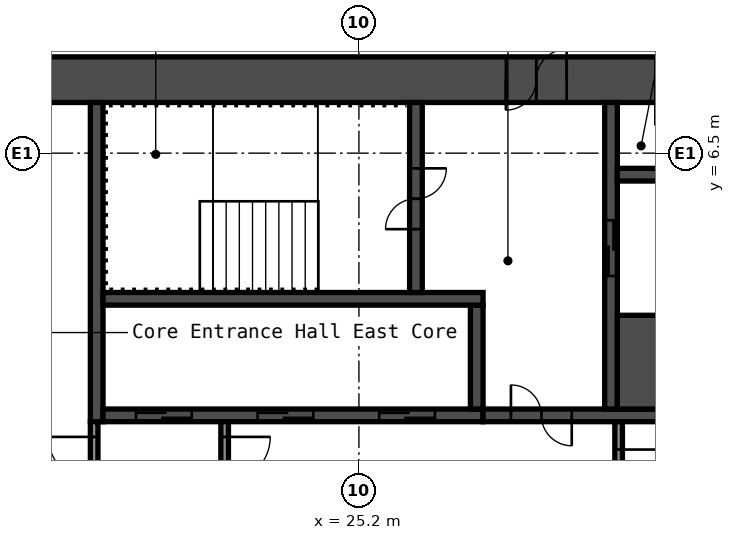
"""IFC4 building model, lengths in metres.
Left out: names, types, materials, properties, quantities, classifications, styles, units other than length and angle.
Written with IfcOpenShell. Run it as: python <this file> out.ifc"""

import sys

from ifc_helpers import new_model, si_unit, direction, frame, frame_2d, origin, place, context, subcontext, project, spatial, rectangle, extrude, element, fill, save


model = new_model("IFC4")
c1 = context("Model", 3, precision=1e-05, world=origin(), true_north=direction((0.0, 1.0)))
c2 = subcontext(c1, "Body", "Model", "MODEL_VIEW")
j1 = project(units=[si_unit("LENGTHUNIT", "METRE"), si_unit("PLANEANGLEUNIT", "RADIAN")], contexts=[c1])
p1 = place(None, origin())
s1 = spatial("IfcSite", under=j1, at=p1, CompositionType="ELEMENT")
p2 = place(p1, origin())
s2 = spatial("IfcBuilding", under=s1, at=p2, CompositionType="ELEMENT")
p3 = place(p2, frame((0.0, 0.0, 48.6)))
s3 = spatial("IfcBuildingStorey", under=s2, at=p3, CompositionType="ELEMENT", Elevation=48.6)
p4 = place(p3, frame((17.7, 7.95, 0.0), z_axis=(0.0, 0.0, 1.0), x_axis=(1.0, 0.0, 0.0)))
e1 = element("IfcWall", 1, at=p4, inside=s3, PredefinedType="SHEAR", context=c2, shape_type="SweptSolid", body=[
    extrude(rectangle(XDim=15.0, YDim=0.9, at=frame_2d((7.5, 0.0))), origin(), (0.0, 0.0, 1.0), 2.8),
])
p5 = place(p4, frame((10.4, 0.0, 0.0)))
e2 = element("IfcOpeningElement", 2, at=p5, cuts=e1, PredefinedType="OPENING", context=c2, shape_type="SweptSolid", body=[
    extrude(rectangle(XDim=1.2, YDim=2.1, at=frame_2d((0.6, 1.05))), frame((0.0, 0.46, 0.0), z_axis=(0.0, -1.0, 0.0), x_axis=(1.0, 0.0, 0.0)), (0.0, 0.0, 1.0), 0.92),
])
p6 = place(p4, frame((13.35, 0.0, 0.0)))
e3 = element("IfcOpeningElement", 3, at=p6, cuts=e1, PredefinedType="OPENING", context=c2, shape_type="SweptSolid", body=[
    extrude(rectangle(XDim=0.9, YDim=2.1, at=frame_2d((0.45, 1.05))), frame((0.0, 0.46, 0.0), z_axis=(0.0, -1.0, 0.0), x_axis=(1.0, 0.0, 0.0)), (0.0, 0.0, 1.0), 0.92),
])
p7 = place(p3, frame((20.025, 1.2, 0.0), z_axis=(0.0, 0.0, 1.0), x_axis=(0.0, 1.0, 0.0)))
e4 = element("IfcWall", 4, at=p7, inside=s3, PredefinedType="SHEAR", context=c2, shape_type="SweptSolid", body=[
    extrude(rectangle(XDim=6.3, YDim=0.25, at=frame_2d((3.15, 0.0))), origin(), (0.0, 0.0, 1.0), 2.8),
])
p8 = place(p3, frame((20.15, 1.325, 0.0), z_axis=(0.0, 0.0, 1.0), x_axis=(1.0, 0.0, 0.0)))
e5 = element("IfcWall", 5, at=p8, inside=s3, PredefinedType="SHEAR", context=c2, shape_type="SweptSolid", body=[
    extrude(rectangle(XDim=7.5, YDim=0.25, at=frame_2d((3.75, 0.0))), origin(), (0.0, 0.0, 1.0), 2.8),
])
p9 = place(p8, frame((0.65, 0.0, 0.0)))
e6 = element("IfcOpeningElement", 6, at=p9, cuts=e5, PredefinedType="OPENING", context=c2, shape_type="SweptSolid", body=[
    extrude(rectangle(XDim=1.1, YDim=2.1, at=frame_2d((0.55, 1.05))), frame((0.0, 0.135, 0.0), z_axis=(0.0, -1.0, 0.0), x_axis=(1.0, 0.0, 0.0)), (0.0, 0.0, 1.0), 0.27),
])
p10 = place(p8, frame((3.05, 0.0, 0.0)))
e7 = element("IfcOpeningElement", 7, at=p10, cuts=e5, PredefinedType="OPENING", context=c2, shape_type="SweptSolid", body=[
    extrude(rectangle(XDim=1.1, YDim=2.1, at=frame_2d((0.55, 1.05))), frame((0.0, 0.135, 0.0), z_axis=(0.0, -1.0, 0.0), x_axis=(1.0, 0.0, 0.0)), (0.0, 0.0, 1.0), 0.27),
])
p11 = place(p8, frame((5.45, 0.0, 0.0)))
e8 = element("IfcOpeningElement", 8, at=p11, cuts=e5, PredefinedType="OPENING", context=c2, shape_type="SweptSolid", body=[
    extrude(rectangle(XDim=1.1, YDim=2.1, at=frame_2d((0.55, 1.05))), frame((0.0, 0.135, 0.0), z_axis=(0.0, -1.0, 0.0), x_axis=(1.0, 0.0, 0.0)), (0.0, 0.0, 1.0), 0.27),
])
p12 = place(p3, frame((27.525, 1.45, 0.0), z_axis=(0.0, 0.0, 1.0), x_axis=(0.0, 1.0, 0.0)))
e9 = element("IfcWall", 9, at=p12, inside=s3, PredefinedType="SHEAR", context=c2, shape_type="SweptSolid", body=[
    extrude(rectangle(XDim=2.05, YDim=0.25, at=frame_2d((1.025, 0.0))), origin(), (0.0, 0.0, 1.0), 2.8),
])
p13 = place(p3, frame((20.15, 3.625, 0.0), z_axis=(0.0, 0.0, 1.0), x_axis=(1.0, 0.0, 0.0)))
e10 = element("IfcWall", 10, at=p13, inside=s3, PredefinedType="SHEAR", context=c2, shape_type="SweptSolid", body=[
    extrude(rectangle(XDim=7.5, YDim=0.25, at=frame_2d((3.75, 0.0))), origin(), (0.0, 0.0, 1.0), 2.8),
])
p14 = place(p3, frame((26.325, 3.75, 0.0), z_axis=(0.0, 0.0, 1.0), x_axis=(0.0, 1.0, 0.0)))
e11 = element("IfcWall", 11, at=p14, inside=s3, PredefinedType="SHEAR", context=c2, shape_type="SweptSolid", body=[
    extrude(rectangle(XDim=3.75, YDim=0.25, at=frame_2d((1.875, 0.0))), origin(), (0.0, 0.0, 1.0), 2.8),
])
p15 = place(p14, frame((1.25, 0.0, 0.0)))
e12 = element("IfcOpeningElement", 12, at=p15, cuts=e11, PredefinedType="OPENING", context=c2, shape_type="SweptSolid", body=[
    extrude(rectangle(XDim=1.2, YDim=2.1, at=frame_2d((0.6, 1.05))), frame((0.0, 0.135, 0.0), z_axis=(0.0, -1.0, 0.0), x_axis=(1.0, 0.0, 0.0)), (0.0, 0.0, 1.0), 0.27),
])
p16 = place(p3, frame((27.65, 1.325, 0.0), z_axis=(0.0, 0.0, 1.0), x_axis=(1.0, 0.0, 0.0)))
e13 = element("IfcWall", 13, at=p16, inside=s3, PredefinedType="SHEAR", context=c2, shape_type="SweptSolid", body=[
    extrude(rectangle(XDim=5.05, YDim=0.25, at=frame_2d((2.525, 0.0))), origin(), (0.0, 0.0, 1.0), 2.8),
])
p17 = place(p16, frame((0.55, 0.0, 0.0)))
e14 = element("IfcOpeningElement", 14, at=p17, cuts=e13, PredefinedType="OPENING", context=c2, shape_type="SweptSolid", body=[
    extrude(rectangle(XDim=1.2, YDim=2.1, at=frame_2d((0.6, 1.05))), frame((0.0, 0.135, 0.0), z_axis=(0.0, -1.0, 0.0), x_axis=(1.0, 0.0, 0.0)), (0.0, 0.0, 1.0), 0.27),
])
p18 = place(p3, frame((30.175, 1.45, 0.0), z_axis=(0.0, 0.0, 1.0), x_axis=(0.0, 1.0, 0.0)))
e15 = element("IfcWall", 15, at=p18, inside=s3, PredefinedType="SHEAR", context=c2, shape_type="SweptSolid", body=[
    extrude(rectangle(XDim=6.05, YDim=0.25, at=frame_2d((3.025, 0.0))), origin(), (0.0, 0.0, 1.0), 2.8),
])
p19 = place(p18, frame((2.625, 0.0, 0.0)))
e16 = element("IfcOpeningElement", 16, at=p19, cuts=e15, PredefinedType="OPENING", context=c2, shape_type="SweptSolid", body=[
    extrude(rectangle(XDim=1.1, YDim=2.1, at=frame_2d((0.55, 1.05))), frame((0.0, 0.135, 0.0), z_axis=(0.0, -1.0, 0.0), x_axis=(1.0, 0.0, 0.0)), (0.0, 0.0, 1.0), 0.27),
])
p20 = place(p3, frame((30.3, 2.375, 0.0), z_axis=(0.0, 0.0, 1.0), x_axis=(1.0, 0.0, 0.0)))
e17 = element("IfcWall", 17, at=p20, inside=s3, PredefinedType="SHEAR", context=c2, shape_type="SweptSolid", body=[
    extrude(rectangle(XDim=2.4, YDim=1.85, at=frame_2d((1.2, 0.0))), origin(), (0.0, 0.0, 1.0), 2.8),
])
p21 = place(p3, frame((30.3, 6.075, 0.0), z_axis=(0.0, 0.0, 1.0), x_axis=(1.0, 0.0, 0.0)))
e18 = element("IfcWall", 18, at=p21, inside=s3, PredefinedType="SHEAR", context=c2, shape_type="SweptSolid", body=[
    extrude(rectangle(XDim=2.4, YDim=0.25, at=frame_2d((1.2, 0.0))), origin(), (0.0, 0.0, 1.0), 2.8),
])
p22 = place(p3, frame((19.975, -1.2, 0.0), z_axis=(0.0, 0.0, 1.0), x_axis=(0.0, 1.0, 0.0)))
e19 = element("IfcWall", 19, at=p22, inside=s3, PredefinedType="PARTITIONING", context=c2, shape_type="SweptSolid", body=[
    extrude(rectangle(XDim=2.4, YDim=0.15, at=frame_2d((1.2, 0.0))), origin(), (0.0, 0.0, 1.0), 2.8),
])
p23 = place(p22, frame((0.3, 0.0, 0.0)))
e20 = element("IfcOpeningElement", 20, at=p23, cuts=e19, PredefinedType="OPENING", context=c2, shape_type="SweptSolid", body=[
    extrude(rectangle(XDim=1.8, YDim=2.1, at=frame_2d((0.9, 1.05))), frame((0.0, 0.085, 0.0), z_axis=(0.0, -1.0, 0.0), x_axis=(1.0, 0.0, 0.0)), (0.0, 0.0, 1.0), 0.17),
])
p24 = place(p3, frame((22.55, -1.2, 0.0), z_axis=(0.0, 0.0, 1.0), x_axis=(0.0, 1.0, 0.0)))
e21 = element("IfcWall", 21, at=p24, inside=s3, PredefinedType="PARTITIONING", context=c2, shape_type="SweptSolid", body=[
    extrude(rectangle(XDim=2.4, YDim=0.15, at=frame_2d((1.2, 0.0))), origin(), (0.0, 0.0, 1.0), 2.8),
])
p25 = place(p24, frame((0.3, 0.0, 0.0)))
e22 = element("IfcOpeningElement", 22, at=p25, cuts=e21, PredefinedType="OPENING", context=c2, shape_type="SweptSolid", body=[
    extrude(rectangle(XDim=1.8, YDim=2.1, at=frame_2d((0.9, 1.05))), frame((0.0, 0.085, 0.0), z_axis=(0.0, -1.0, 0.0), x_axis=(1.0, 0.0, 0.0)), (0.0, 0.0, 1.0), 0.17),
])
p26 = place(p3, frame((30.325, -0.95, 0.0), z_axis=(0.0, 0.0, 1.0), x_axis=(0.0, 1.0, 0.0)))
e23 = element("IfcWall", 23, at=p26, inside=s3, PredefinedType="PARTITIONING", context=c2, shape_type="SweptSolid", body=[
    extrude(rectangle(XDim=2.15, YDim=0.15, at=frame_2d((1.075, 0.0))), origin(), (0.0, 0.0, 1.0), 2.8),
])
p27 = place(p26, frame((0.7, 0.0, 0.0)))
e24 = element("IfcOpeningElement", 24, at=p27, cuts=e23, PredefinedType="OPENING", context=c2, shape_type="SweptSolid", body=[
    extrude(rectangle(XDim=0.9, YDim=2.1, at=frame_2d((0.45, 1.05))), frame((0.0, 0.085, 0.0), z_axis=(0.0, -1.0, 0.0), x_axis=(1.0, 0.0, 0.0)), (0.0, 0.0, 1.0), 0.17),
])
p28 = place(p5, origin())
e25 = element("IfcDoor", 25, at=p28, inside=s3, OperationType="DOUBLE_DOOR_SINGLE_SWING", PredefinedType="DOOR", context=c2, shape_type="SweptSolid", body=[
    extrude(rectangle(XDim=1.2, YDim=2.1, at=frame_2d((0.6, 1.05))), frame((0.0, 0.025, 0.0), z_axis=(0.0, -1.0, 0.0), x_axis=(1.0, 0.0, 0.0)), (0.0, 0.0, 1.0), 0.05),
])
fill(e2, e25)
p29 = place(p15, origin())
e26 = element("IfcDoor", 26, at=p29, inside=s3, OperationType="DOUBLE_DOOR_SINGLE_SWING", PredefinedType="DOOR", context=c2, shape_type="SweptSolid", body=[
    extrude(rectangle(XDim=1.2, YDim=2.1, at=frame_2d((0.6, 1.05))), frame((0.0, 0.025, 0.0), z_axis=(0.0, -1.0, 0.0), x_axis=(1.0, 0.0, 0.0)), (0.0, 0.0, 1.0), 0.05),
])
fill(e12, e26)
p30 = place(p17, origin())
e27 = element("IfcDoor", 27, at=p30, inside=s3, OperationType="DOUBLE_DOOR_SINGLE_SWING", PredefinedType="DOOR", context=c2, shape_type="SweptSolid", body=[
    extrude(rectangle(XDim=1.2, YDim=2.1, at=frame_2d((0.6, 1.05))), frame((0.0, 0.025, 0.0), z_axis=(0.0, -1.0, 0.0), x_axis=(1.0, 0.0, 0.0)), (0.0, 0.0, 1.0), 0.05),
])
fill(e14, e27)
p31 = place(p23, origin())
e28 = element("IfcDoor", 28, at=p31, inside=s3, OperationType="DOUBLE_DOOR_SINGLE_SWING", PredefinedType="DOOR", context=c2, shape_type="SweptSolid", body=[
    extrude(rectangle(XDim=1.8, YDim=2.1, at=frame_2d((0.9, 1.05))), frame((0.0, 0.025, 0.0), z_axis=(0.0, -1.0, 0.0), x_axis=(1.0, 0.0, 0.0)), (0.0, 0.0, 1.0), 0.05),
])
fill(e20, e28)
p32 = place(p25, origin())
e29 = element("IfcDoor", 29, at=p32, inside=s3, OperationType="DOUBLE_DOOR_SINGLE_SWING", PredefinedType="DOOR", context=c2, shape_type="SweptSolid", body=[
    extrude(rectangle(XDim=1.8, YDim=2.1, at=frame_2d((0.9, 1.05))), frame((0.0, 0.025, 0.0), z_axis=(0.0, -1.0, 0.0), x_axis=(1.0, 0.0, 0.0)), (0.0, 0.0, 1.0), 0.05),
])
fill(e22, e29)
p33 = place(p27, origin())
e30 = element("IfcDoor", 30, at=p33, inside=s3, OperationType="SINGLE_SWING_RIGHT", PredefinedType="DOOR", context=c2, shape_type="SweptSolid", body=[
    extrude(rectangle(XDim=0.9, YDim=2.1, at=frame_2d((0.45, 1.05))), frame((0.0, 0.025, 0.0), z_axis=(0.0, -1.0, 0.0), x_axis=(1.0, 0.0, 0.0)), (0.0, 0.0, 1.0), 0.05),
])
fill(e24, e30)
p34 = place(p9, origin())
e31 = element("IfcDoor", 31, at=p34, inside=s3, OperationType="DOUBLE_DOOR_SLIDING", PredefinedType="DOOR", context=c2, shape_type="SweptSolid", body=[
    extrude(rectangle(XDim=1.1, YDim=2.1, at=frame_2d((0.55, 1.05))), frame((0.0, 0.025, 0.0), z_axis=(0.0, -1.0, 0.0), x_axis=(1.0, 0.0, 0.0)), (0.0, 0.0, 1.0), 0.05),
])
fill(e6, e31)
p35 = place(p10, origin())
e32 = element("IfcDoor", 32, at=p35, inside=s3, OperationType="DOUBLE_DOOR_SLIDING", PredefinedType="DOOR", context=c2, shape_type="SweptSolid", body=[
    extrude(rectangle(XDim=1.1, YDim=2.1, at=frame_2d((0.55, 1.05))), frame((0.0, 0.025, 0.0), z_axis=(0.0, -1.0, 0.0), x_axis=(1.0, 0.0, 0.0)), (0.0, 0.0, 1.0), 0.05),
])
fill(e7, e32)
p36 = place(p11, origin())
e33 = element("IfcDoor", 33, at=p36, inside=s3, OperationType="DOUBLE_DOOR_SLIDING", PredefinedType="DOOR", context=c2, shape_type="SweptSolid", body=[
    extrude(rectangle(XDim=1.1, YDim=2.1, at=frame_2d((0.55, 1.05))), frame((0.0, 0.025, 0.0), z_axis=(0.0, -1.0, 0.0), x_axis=(1.0, 0.0, 0.0)), (0.0, 0.0, 1.0), 0.05),
])
fill(e8, e33)
p37 = place(p19, origin())
e34 = element("IfcDoor", 34, at=p37, inside=s3, OperationType="DOUBLE_DOOR_SLIDING", PredefinedType="DOOR", context=c2, shape_type="SweptSolid", body=[
    extrude(rectangle(XDim=1.1, YDim=2.1, at=frame_2d((0.55, 1.05))), frame((0.0, 0.025, 0.0), z_axis=(0.0, -1.0, 0.0), x_axis=(1.0, 0.0, 0.0)), (0.0, 0.0, 1.0), 0.05),
])
fill(e16, e34)
save(model, sys.argv[1])
